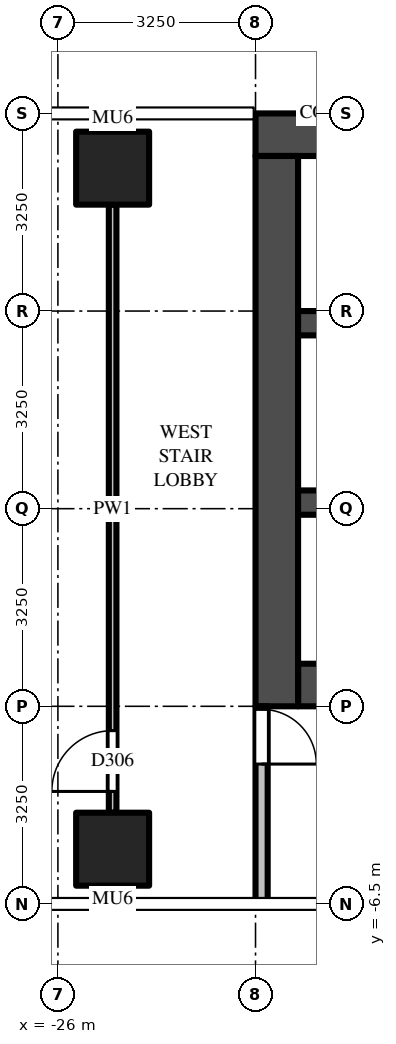
"""IFC4 building model, lengths in metres.
Left out: names, types, materials, properties, quantities, classifications, styles, units other than length and angle.
Written with IfcOpenShell. Run it as: python <this file> out.ifc"""

import sys

from ifc_helpers import new_model, si_unit, direction, frame, frame_2d, origin, origin_2d, place, context, subcontext, project, spatial, rectangle, extrude, source, transform, mapped, element, fill, save


model = new_model("IFC4")
c1 = context("Model", 3, precision=1e-05, world=origin(), true_north=direction((0.0, 1.0)))
c2 = subcontext(c1, "Body", "Model", "MODEL_VIEW")
j1 = project(units=[si_unit("LENGTHUNIT", "METRE"), si_unit("PLANEANGLEUNIT", "RADIAN")], contexts=[c1])
p1 = place(None, origin())
s1 = spatial("IfcSite", under=j1, at=p1, CompositionType="ELEMENT")
p2 = place(p1, origin())
s2 = spatial("IfcBuilding", under=s1, at=p2, CompositionType="ELEMENT")
p3 = place(p2, frame((0.0, 0.0, 156.0)))
s3 = spatial("IfcBuildingStorey", under=s2, at=p3, CompositionType="ELEMENT", Elevation=156.0)
m1 = source(origin(), c2, "Body", "SweptSolid", [
    extrude(rectangle(XDim=1.2, YDim=1.2, at=origin_2d()), origin(), (0.0, 0.0, 1.0), 6.0),
])
for number, where, z_axis, x_axis in (
    (1, (-25.1, -5.6, 0.0), (0.0, 0.0, 1.0), (1.0, 0.0, 0.0)),
    (2, (-25.1, 5.6, 0.0), (0.0, 0.0, 1.0), (1.0, 0.0, 0.0)),
):
    element("IfcColumn", number, at=place(p3, frame(where, z_axis=z_axis, x_axis=x_axis)), inside=s3, PredefinedType="COLUMN", context=c2, shape_type="MappedRepresentation", body=[
        mapped(m1, transform((0.0, 0.0, 0.0))),
    ])
m2 = source(origin(), c2, "Body", "SweptSolid", [
    extrude(rectangle(XDim=16.55, YDim=0.7, at=frame_2d((8.275, 0.0))), origin(), (0.0, 0.0, 1.0), 5.8),
])
p4 = place(p3, frame((-6.2, 6.15, 0.0), z_axis=(0.0, 0.0, 1.0), x_axis=(-1.0, 0.0, 0.0)))
e3 = element("IfcWall", 3, at=p4, inside=s3, PredefinedType="SHEAR", context=c2, shape_type="MappedRepresentation", body=[
    mapped(m2, transform((0.0, 0.0, 0.0))),
])
m3 = source(origin(), c2, "Body", "SweptSolid", [
    extrude(rectangle(XDim=14.85, YDim=0.7, at=frame_2d((7.425, 0.0))), origin(), (0.0, 0.0, 1.0), 5.8),
])
p5 = place(p3, frame((-7.2, -2.9, 0.0), z_axis=(0.0, 0.0, 1.0), x_axis=(-1.0, 0.0, 0.0)))
e4 = element("IfcWall", 4, at=p5, inside=s3, PredefinedType="SHEAR", context=c2, shape_type="MappedRepresentation", body=[
    mapped(m3, transform((0.0, 0.0, 0.0))),
])
m4 = source(origin(), c2, "Body", "SweptSolid", [
    extrude(rectangle(XDim=1.1, YDim=2.1, at=frame_2d((0.55, 1.05))), frame((0.0, 0.36, 0.0), z_axis=(0.0, -1.0, 0.0), x_axis=(1.0, 0.0, 0.0)), (0.0, 0.0, 1.0), 0.72),
])
p6 = place(p5, frame((0.55, 0.0, 0.0)))
e5 = element("IfcOpeningElement", 5, at=p6, cuts=e4, PredefinedType="OPENING", context=c2, shape_type="MappedRepresentation", body=[
    mapped(m4, transform((0.0, 0.0, 0.0))),
])
p7 = place(p5, frame((3.15, 0.0, 0.0)))
e6 = element("IfcOpeningElement", 6, at=p7, cuts=e4, PredefinedType="OPENING", context=c2, shape_type="MappedRepresentation", body=[
    mapped(m4, transform((0.0, 0.0, 0.0))),
])
m5 = source(origin(), c2, "Body", "SweptSolid", [
    extrude(rectangle(XDim=1.2, YDim=2.1, at=frame_2d((0.6, 1.05))), frame((0.0, 0.36, 0.0), z_axis=(0.0, -1.0, 0.0), x_axis=(1.0, 0.0, 0.0)), (0.0, 0.0, 1.0), 0.72),
])
p8 = place(p5, frame((5.7, 0.0, 0.0)))
e7 = element("IfcOpeningElement", 7, at=p8, cuts=e4, PredefinedType="OPENING", context=c2, shape_type="MappedRepresentation", body=[
    mapped(m5, transform((0.0, 0.0, 0.0))),
])
m6 = source(origin(), c2, "Body", "SweptSolid", [
    extrude(rectangle(XDim=1.3, YDim=2.1, at=frame_2d((0.65, 1.05))), frame((0.0, 0.36, 0.0), z_axis=(0.0, -1.0, 0.0), x_axis=(1.0, 0.0, 0.0)), (0.0, 0.0, 1.0), 0.72),
])
p9 = place(p5, frame((12.2, 0.0, 0.0)))
e8 = element("IfcOpeningElement", 8, at=p9, cuts=e4, PredefinedType="OPENING", context=c2, shape_type="MappedRepresentation", body=[
    mapped(m6, transform((0.0, 0.0, 0.0))),
])
p10 = place(p5, frame((9.85, 0.0, 0.0)))
e9 = element("IfcOpeningElement", 9, at=p10, cuts=e4, PredefinedType="OPENING", context=c2, shape_type="MappedRepresentation", body=[
    mapped(m5, transform((0.0, 0.0, 0.0))),
])
m7 = source(origin(), c2, "Body", "SweptSolid", [
    extrude(rectangle(XDim=1.0, YDim=2.1, at=frame_2d((0.5, 1.05))), frame((0.0, 0.36, 0.0), z_axis=(0.0, -1.0, 0.0), x_axis=(1.0, 0.0, 0.0)), (0.0, 0.0, 1.0), 0.72),
])
p11 = place(p5, frame((7.9, 0.0, 0.0)))
e10 = element("IfcOpeningElement", 10, at=p11, cuts=e4, PredefinedType="OPENING", context=c2, shape_type="MappedRepresentation", body=[
    mapped(m7, transform((0.0, 0.0, 0.0))),
])
m8 = source(origin(), c2, "Body", "SweptSolid", [
    extrude(rectangle(XDim=9.05, YDim=0.7, at=frame_2d((4.525, 0.0))), origin(), (0.0, 0.0, 1.0), 5.8),
])
p12 = place(p3, frame((-22.4, 5.8, 0.0), z_axis=(0.0, 0.0, 1.0), x_axis=(0.0, -1.0, 0.0)))
e11 = element("IfcWall", 11, at=p12, inside=s3, PredefinedType="SHEAR", context=c2, shape_type="MappedRepresentation", body=[
    mapped(m8, transform((0.0, 0.0, 0.0))),
])
m9 = source(origin(), c2, "Body", "SweptSolid", [
    extrude(rectangle(XDim=14.85, YDim=0.4, at=frame_2d((7.425, 0.0))), origin(), (0.0, 0.0, 1.0), 5.8),
])
p13 = place(p3, frame((-7.2, 0.1, 0.0), z_axis=(0.0, 0.0, 1.0), x_axis=(-1.0, 0.0, 0.0)))
e12 = element("IfcWall", 12, at=p13, inside=s3, PredefinedType="SHEAR", context=c2, shape_type="MappedRepresentation", body=[
    mapped(m9, transform((0.0, 0.0, 0.0))),
])
m10 = source(origin(), c2, "Body", "SweptSolid", [
    extrude(rectangle(XDim=1.0, YDim=2.1, at=frame_2d((0.5, 1.05))), frame((0.0, 0.21, 0.0), z_axis=(0.0, -1.0, 0.0), x_axis=(1.0, 0.0, 0.0)), (0.0, 0.0, 1.0), 0.42),
])
p14 = place(p13, frame((7.9, 0.0, 0.0)))
e13 = element("IfcOpeningElement", 13, at=p14, cuts=e12, PredefinedType="OPENING", context=c2, shape_type="MappedRepresentation", body=[
    mapped(m10, transform((0.0, 0.0, 0.0))),
])
m11 = source(origin(), c2, "Body", "SweptSolid", [
    extrude(rectangle(XDim=5.7, YDim=0.4, at=frame_2d((2.85, 0.0))), origin(), (0.0, 0.0, 1.0), 5.8),
])
p15 = place(p3, frame((-16.35, 3.05, 0.0), z_axis=(0.0, 0.0, 1.0), x_axis=(-1.0, 0.0, 0.0)))
e14 = element("IfcWall", 14, at=p15, inside=s3, PredefinedType="SHEAR", context=c2, shape_type="MappedRepresentation", body=[
    mapped(m11, transform((0.0, 0.0, 0.0))),
])
m12 = source(origin(), c2, "Body", "SweptSolid", [
    extrude(rectangle(XDim=3.25, YDim=0.2, at=frame_2d((1.625, 0.0))), origin(), (0.0, 0.0, 1.0), 5.8),
])
p16 = place(p3, frame((-22.65, -3.25, 0.0), z_axis=(0.0, 0.0, 1.0), x_axis=(0.0, -1.0, 0.0)))
e15 = element("IfcWall", 15, at=p16, inside=s3, PredefinedType="PARTITIONING", context=c2, shape_type="MappedRepresentation", body=[
    mapped(m12, transform((0.0, 0.0, 0.0))),
])
m13 = source(origin(), c2, "Body", "SweptSolid", [
    extrude(rectangle(XDim=0.9, YDim=2.1, at=frame_2d((0.45, 1.05))), frame((0.0, 0.11, 0.0), z_axis=(0.0, -1.0, 0.0), x_axis=(1.0, 0.0, 0.0)), (0.0, 0.0, 1.0), 0.22),
])
p17 = place(p16, frame((0.05, 0.0, 0.0)))
e16 = element("IfcOpeningElement", 16, at=p17, cuts=e15, PredefinedType="OPENING", context=c2, shape_type="MappedRepresentation", body=[
    mapped(m13, transform((0.0, 0.0, 0.0))),
])
p18 = place(p3, frame((-25.1, -5.0, 0.0), z_axis=(0.0, 0.0, 1.0), x_axis=(0.0, 1.0, 0.0)))
e17 = element("IfcWall", 17, at=p18, inside=s3, PredefinedType="PARTITIONING", context=c2, shape_type="SweptSolid", body=[
    extrude(rectangle(XDim=10.0, YDim=0.125, at=frame_2d((5.0, 0.0))), origin(), (0.0, 0.0, 1.0), 5.097),
])
m14 = source(origin(), c2, "Body", "SweptSolid", [
    extrude(rectangle(XDim=1.0, YDim=2.1, at=frame_2d((0.5, 1.05))), frame((0.0, 0.073, 0.0), z_axis=(0.0, -1.0, 0.0), x_axis=(1.0, 0.0, 0.0)), (0.0, 0.0, 1.0), 0.145),
])
p19 = place(p18, frame((0.35, 0.0, 0.0)))
e18 = element("IfcOpeningElement", 18, at=p19, cuts=e17, PredefinedType="OPENING", context=c2, shape_type="MappedRepresentation", body=[
    mapped(m14, transform((0.0, 0.0, 0.0))),
])
m15 = source(origin(), c2, "Body", "SweptSolid", [
    extrude(rectangle(XDim=0.9, YDim=2.1, at=frame_2d((0.45, 1.05))), frame((0.0, 0.025, 0.0), z_axis=(0.0, -1.0, 0.0), x_axis=(1.0, 0.0, 0.0)), (0.0, 0.0, 1.0), 0.05),
])
p20 = place(p17, origin())
e19 = element("IfcDoor", 19, at=p20, inside=s3, OperationType="SINGLE_SWING_RIGHT", PredefinedType="DOOR", context=c2, shape_type="MappedRepresentation", body=[
    mapped(m15, transform((0.0, 0.0, 0.0))),
])
fill(e16, e19)
m16 = source(origin(), c2, "Body", "SweptSolid", [
    extrude(rectangle(XDim=1.0, YDim=2.1, at=frame_2d((0.5, 1.05))), frame((0.0, 0.025, 0.0), z_axis=(0.0, -1.0, 0.0), x_axis=(1.0, 0.0, 0.0)), (0.0, 0.0, 1.0), 0.05),
])
p21 = place(p19, origin())
e20 = element("IfcDoor", 20, at=p21, inside=s3, OperationType="SINGLE_SWING_LEFT", PredefinedType="DOOR", context=c2, shape_type="MappedRepresentation", body=[
    mapped(m16, transform((0.0, 0.0, 0.0))),
])
fill(e18, e20)
save(model, sys.argv[1])
